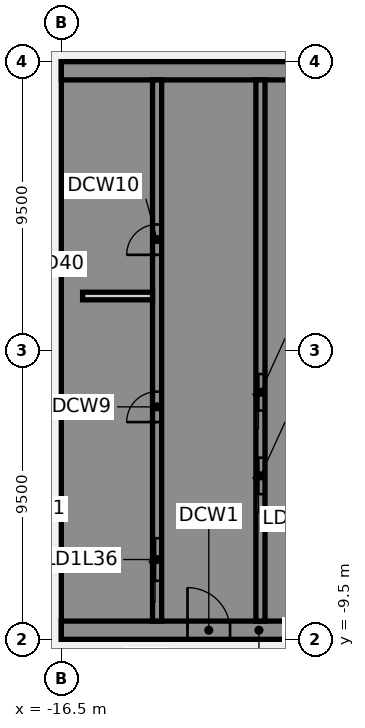
"""IFC4 building model, lengths in metres.
Left out: names, types, materials, properties, quantities, classifications, styles, units other than length and angle.
Written with IfcOpenShell. Run it as: python <this file> out.ifc"""

import sys

from ifc_helpers import new_model, si_unit, direction, frame, frame_2d, origin, place, context, subcontext, project, spatial, polyline, rectangle, outline, extrude, element, fill, save


model = new_model("IFC4")
c1 = context("Model", 3, precision=1e-05, world=origin(), true_north=direction((0.0, 1.0)))
c2 = subcontext(c1, "Body", "Model", "MODEL_VIEW")
j1 = project(units=[si_unit("LENGTHUNIT", "METRE"), si_unit("PLANEANGLEUNIT", "RADIAN")], contexts=[c1])
p1 = place(None, origin())
s1 = spatial("IfcSite", under=j1, at=p1, CompositionType="ELEMENT")
p2 = place(p1, origin())
s2 = spatial("IfcBuilding", under=s1, at=p2, CompositionType="ELEMENT")
p3 = place(p2, frame((0.0, 0.0, 148.0)))
s3 = spatial("IfcBuildingStorey", under=s2, at=p3, CompositionType="ELEMENT", Elevation=148.0)
p4 = place(p3, frame((-16.5, -9.2, 0.0), z_axis=(0.0, 0.0, 1.0), x_axis=(1.0, 0.0, 0.0)))
e1 = element("IfcWall", 1, at=p4, inside=s3, PredefinedType="SHEAR", context=c2, shape_type="SweptSolid", body=[
    extrude(rectangle(XDim=13.0, YDim=0.6, at=frame_2d((6.5, 0.0))), origin(), (0.0, 0.0, 1.0), 3.61),
])
p5 = place(p4, frame((4.15, 0.0, 0.0)))
e2 = element("IfcOpeningElement", 2, at=p5, cuts=e1, PredefinedType="OPENING", context=c2, shape_type="SweptSolid", body=[
    extrude(rectangle(XDim=1.4, YDim=2.1, at=frame_2d((0.7, 1.05))), frame((0.0, 0.31, 0.0), z_axis=(0.0, -1.0, 0.0), x_axis=(1.0, 0.0, 0.0)), (0.0, 0.0, 1.0), 0.62),
])
p6 = place(p4, frame((10.125, 0.0, 0.0)))
e3 = element("IfcOpeningElement", 3, at=p6, cuts=e1, PredefinedType="OPENING", context=c2, shape_type="SweptSolid", body=[
    extrude(rectangle(XDim=1.4, YDim=2.1, at=frame_2d((0.7, 1.05))), frame((0.0, 0.31, 0.0), z_axis=(0.0, -1.0, 0.0), x_axis=(1.0, 0.0, 0.0)), (0.0, 0.0, 1.0), 0.62),
])
p7 = place(p3, origin())
e4 = element("IfcWall", 4, at=p7, inside=s3, PredefinedType="SHEAR", context=c2, shape_type="SweptSolid", body=[
    extrude(outline(polyline([(-13.5, -8.125), (-15.9, -8.125), (-15.9, -5.625), (-13.5, -5.625), (-13.5, -5.375), (-15.9, -5.375), (-15.9, 5.375), (-13.5, 5.375), (-13.5, 5.625), (-15.9, 5.625), (-15.9, 8.125), (-13.5, 8.125), (-13.5, 8.9), (-15.9, 8.9), (-16.5, 8.9), (-16.5, -8.9), (-15.9, -8.9), (-13.5, -8.9), (-13.5, -8.125)])), origin(), (0.0, 0.0, 1.0), 3.61),
])
p8 = place(p3, frame((-16.5, 9.2, 0.0), z_axis=(0.0, 0.0, 1.0), x_axis=(1.0, 0.0, 0.0)))
e5 = element("IfcWall", 5, at=p8, inside=s3, PredefinedType="SHEAR", context=c2, shape_type="SweptSolid", body=[
    extrude(rectangle(XDim=13.0, YDim=0.6, at=frame_2d((6.5, 0.0))), origin(), (0.0, 0.0, 1.0), 3.61),
])
p9 = place(p3, origin())
e6 = element("IfcWall", 6, at=p9, inside=s3, PredefinedType="SHEAR", context=c2, shape_type="SweptSolid", body=[
    extrude(outline(polyline([(-9.8, -5.375), (-9.8, -5.625), (-7.5, -5.625), (-7.2, -5.625), (-7.2, 8.9), (-7.5, 8.9), (-9.8, 8.9), (-9.8, 8.125), (-7.5, 8.125), (-7.5, 5.625), (-9.8, 5.625), (-9.8, 5.375), (-7.5, 5.375), (-7.5, 2.875), (-9.8, 2.875), (-9.8, 2.625), (-7.5, 2.625), (-7.5, 0.125), (-9.8, 0.125), (-9.8, -0.125), (-7.5, -0.125), (-7.5, -2.625), (-9.8, -2.625), (-9.8, -2.875), (-7.5, -2.875), (-7.5, -5.375), (-9.8, -5.375)])), origin(), (0.0, 0.0, 1.0), 3.61),
])
p10 = place(p3, origin())
e7 = element("IfcWall", 7, at=p10, inside=s3, PredefinedType="SHEAR", context=c2, shape_type="SweptSolid", body=[
    extrude(outline(polyline([(-7.5, -8.125), (-9.55, -8.125), (-9.55, -5.625), (-9.8, -5.625), (-9.8, -8.125), (-9.8, -8.9), (-7.5, -8.9), (-7.5, -8.125)])), origin(), (0.0, 0.0, 1.0), 3.61),
])
p11 = place(p3, frame((-13.35, -8.9, 0.0), z_axis=(0.0, 0.0, 1.0), x_axis=(0.0, 1.0, 0.0)))
e8 = element("IfcWall", 8, at=p11, inside=s3, PredefinedType="SHEAR", context=c2, shape_type="SweptSolid", body=[
    extrude(rectangle(XDim=17.8, YDim=0.3, at=frame_2d((8.9, 0.0))), origin(), (0.0, 0.0, 1.0), 3.61),
])
p12 = place(p11, frame((1.325, 0.0, 0.0)))
e9 = element("IfcOpeningElement", 9, at=p12, cuts=e8, PredefinedType="OPENING", context=c2, shape_type="SweptSolid", body=[
    extrude(rectangle(XDim=1.4, YDim=2.1, at=frame_2d((0.7, 1.05))), frame((0.0, 0.16, 0.0), z_axis=(0.0, -1.0, 0.0), x_axis=(1.0, 0.0, 0.0)), (0.0, 0.0, 1.0), 0.32),
])
p13 = place(p11, frame((6.546, 0.0, 0.0)))
e10 = element("IfcOpeningElement", 10, at=p13, cuts=e8, PredefinedType="OPENING", context=c2, shape_type="SweptSolid", body=[
    extrude(rectangle(XDim=1.0, YDim=2.1, at=frame_2d((0.5, 1.05))), frame((0.0, 0.16, 0.0), z_axis=(0.0, -1.0, 0.0), x_axis=(1.0, 0.0, 0.0)), (0.0, 0.0, 1.0), 0.32),
])
p14 = place(p11, frame((12.046, 0.0, 0.0)))
e11 = element("IfcOpeningElement", 11, at=p14, cuts=e8, PredefinedType="OPENING", context=c2, shape_type="SweptSolid", body=[
    extrude(rectangle(XDim=1.0, YDim=2.1, at=frame_2d((0.5, 1.05))), frame((0.0, 0.16, 0.0), z_axis=(0.0, -1.0, 0.0), x_axis=(1.0, 0.0, 0.0)), (0.0, 0.0, 1.0), 0.32),
])
p15 = place(p3, frame((-9.95, -8.9, 0.0), z_axis=(0.0, 0.0, 1.0), x_axis=(0.0, 1.0, 0.0)))
e12 = element("IfcWall", 12, at=p15, inside=s3, PredefinedType="SHEAR", context=c2, shape_type="SweptSolid", body=[
    extrude(rectangle(XDim=17.8, YDim=0.3, at=frame_2d((8.9, 0.0))), origin(), (0.0, 0.0, 1.0), 3.61),
])
p16 = place(p15, frame((4.175, 0.0, 0.0)))
e13 = element("IfcOpeningElement", 13, at=p16, cuts=e12, PredefinedType="OPENING", context=c2, shape_type="SweptSolid", body=[
    extrude(rectangle(XDim=1.2, YDim=2.1, at=frame_2d((0.6, 1.05))), frame((0.0, 0.16, 0.0), z_axis=(0.0, -1.0, 0.0), x_axis=(1.0, 0.0, 0.0)), (0.0, 0.0, 1.0), 0.32),
])
p17 = place(p15, frame((6.925, 0.0, 0.0)))
e14 = element("IfcOpeningElement", 14, at=p17, cuts=e12, PredefinedType="OPENING", context=c2, shape_type="SweptSolid", body=[
    extrude(rectangle(XDim=1.2, YDim=2.1, at=frame_2d((0.6, 1.05))), frame((0.0, 0.16, 0.0), z_axis=(0.0, -1.0, 0.0), x_axis=(1.0, 0.0, 0.0)), (0.0, 0.0, 1.0), 0.32),
])
p18 = place(p3, frame((-15.8, 1.792, 0.0), z_axis=(0.0, 0.0, 1.0), x_axis=(1.0, 0.0, 0.0)))
e15 = element("IfcWall", 15, at=p18, inside=s3, PredefinedType="PARTITIONING", context=c2, shape_type="SweptSolid", body=[
    extrude(rectangle(XDim=2.3, YDim=0.25, at=frame_2d((1.15, 0.0))), origin(), (0.0, 0.0, 1.0), 3.61),
])
p19 = place(p5, origin())
e16 = element("IfcDoor", 16, at=p19, inside=s3, OperationType="SINGLE_SWING_LEFT", PredefinedType="DOOR", context=c2, shape_type="SweptSolid", body=[
    extrude(rectangle(XDim=1.4, YDim=2.1, at=frame_2d((0.7, 1.05))), frame((0.0, 0.025, 0.0), z_axis=(0.0, -1.0, 0.0), x_axis=(1.0, 0.0, 0.0)), (0.0, 0.0, 1.0), 0.05),
])
fill(e2, e16)
p20 = place(p12, origin())
e17 = element("IfcDoor", 17, at=p20, inside=s3, OperationType="SLIDING_TO_LEFT", PredefinedType="DOOR", context=c2, shape_type="SweptSolid", body=[
    extrude(rectangle(XDim=1.4, YDim=2.1, at=frame_2d((0.7, 1.05))), frame((0.0, 0.025, 0.0), z_axis=(0.0, -1.0, 0.0), x_axis=(1.0, 0.0, 0.0)), (0.0, 0.0, 1.0), 0.05),
])
fill(e9, e17)
p21 = place(p16, origin())
e18 = element("IfcDoor", 18, at=p21, inside=s3, OperationType="SLIDING_TO_LEFT", PredefinedType="DOOR", context=c2, shape_type="SweptSolid", body=[
    extrude(rectangle(XDim=1.2, YDim=2.1, at=frame_2d((0.6, 1.05))), frame((0.0, 0.025, 0.0), z_axis=(0.0, -1.0, 0.0), x_axis=(1.0, 0.0, 0.0)), (0.0, 0.0, 1.0), 0.05),
])
fill(e13, e18)
p22 = place(p17, origin())
e19 = element("IfcDoor", 19, at=p22, inside=s3, OperationType="SLIDING_TO_LEFT", PredefinedType="DOOR", context=c2, shape_type="SweptSolid", body=[
    extrude(rectangle(XDim=1.2, YDim=2.1, at=frame_2d((0.6, 1.05))), frame((0.0, 0.025, 0.0), z_axis=(0.0, -1.0, 0.0), x_axis=(1.0, 0.0, 0.0)), (0.0, 0.0, 1.0), 0.05),
])
fill(e14, e19)
p23 = place(p13, origin())
e20 = element("IfcDoor", 20, at=p23, inside=s3, OperationType="SINGLE_SWING_LEFT", PredefinedType="DOOR", context=c2, shape_type="SweptSolid", body=[
    extrude(rectangle(XDim=1.0, YDim=2.1, at=frame_2d((0.5, 1.05))), frame((0.0, 0.025, 0.0), z_axis=(0.0, -1.0, 0.0), x_axis=(1.0, 0.0, 0.0)), (0.0, 0.0, 1.0), 0.05),
])
fill(e10, e20)
p24 = place(p14, origin())
e21 = element("IfcDoor", 21, at=p24, inside=s3, OperationType="SINGLE_SWING_LEFT", PredefinedType="DOOR", context=c2, shape_type="SweptSolid", body=[
    extrude(rectangle(XDim=1.0, YDim=2.1, at=frame_2d((0.5, 1.05))), frame((0.0, 0.025, 0.0), z_axis=(0.0, -1.0, 0.0), x_axis=(1.0, 0.0, 0.0)), (0.0, 0.0, 1.0), 0.05),
])
fill(e11, e21)
save(model, sys.argv[1])
